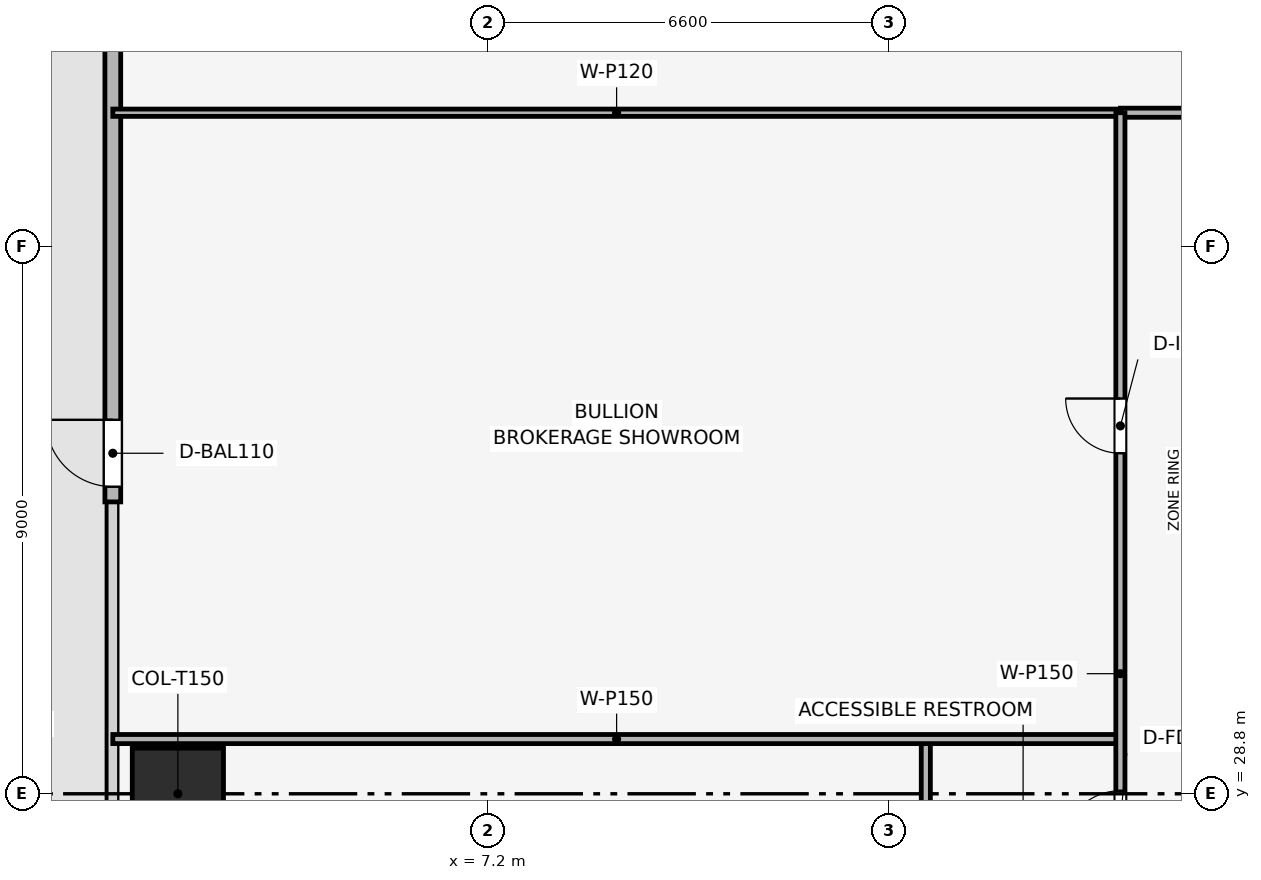
"""IFC4 building model, lengths in metres.
Left out: names, types, materials, properties, quantities, classifications, styles, units other than length and angle.
Written with IfcOpenShell. Run it as: python <this file> out.ifc"""

import sys

from ifc_helpers import new_model, si_unit, direction, frame, frame_2d, origin, origin_2d, place, context, subcontext, project, spatial, rectangle, extrude, element, fill, save


model = new_model("IFC4")
c1 = context("Model", 3, precision=1e-05, world=origin(), true_north=direction((0.0, 1.0)))
c2 = subcontext(c1, "Body", "Model", "MODEL_VIEW")
j1 = project(units=[si_unit("LENGTHUNIT", "METRE"), si_unit("PLANEANGLEUNIT", "RADIAN")], contexts=[c1])
p1 = place(None, origin())
s1 = spatial("IfcSite", under=j1, at=p1, CompositionType="ELEMENT")
p2 = place(p1, origin())
s2 = spatial("IfcBuilding", under=s1, at=p2, CompositionType="ELEMENT")
p3 = place(p2, frame((0.0, 0.0, 76.8)))
s3 = spatial("IfcBuildingStorey", under=s2, at=p3, CompositionType="ELEMENT", Elevation=76.8)
p4 = place(p3, frame((2.1, 28.8, 0.003), z_axis=(0.0, 0.0, 1.0), x_axis=(1.0, 0.0, 0.0)))
e1 = element("IfcColumn", 1, at=p4, inside=s3, PredefinedType="COLUMN", context=c2, shape_type="SweptSolid", body=[
    extrude(rectangle(XDim=1.5, YDim=1.5, at=origin_2d()), origin(), (0.0, 0.0, 1.0), 3.644),
])
p5 = place(p3, frame((1.03, 33.6, 0.0), z_axis=(0.0, 0.0, 1.0), x_axis=(0.0, 1.0, 0.0)))
e2 = element("IfcWall", 2, at=p5, inside=s3, PredefinedType="SOLIDWALL", context=c2, shape_type="SweptSolid", body=[
    extrude(rectangle(XDim=15.3, YDim=0.26, at=frame_2d((7.65, 0.0))), origin(), (0.0, 0.0, 1.0), 3.65),
])
p6 = place(p5, frame((0.25, 0.0, 0.0)))
e3 = element("IfcOpeningElement", 3, at=p6, cuts=e2, PredefinedType="OPENING", context=c2, shape_type="SweptSolid", body=[
    extrude(rectangle(XDim=1.1, YDim=2.2, at=frame_2d((0.55, 1.1))), frame((0.0, 0.14, 0.0), z_axis=(0.0, -1.0, 0.0), x_axis=(1.0, 0.0, 0.0)), (0.0, 0.0, 1.0), 0.28),
])
p7 = place(p3, frame((1.03, 40.0, 0.0), z_axis=(0.0, 0.0, 1.0), x_axis=(1.0, 0.0, 0.0)))
e4 = element("IfcWall", 4, at=p7, inside=s3, PredefinedType="PARTITIONING", context=c2, shape_type="SweptSolid", body=[
    extrude(rectangle(XDim=16.57, YDim=0.12, at=frame_2d((8.285, 0.0))), origin(), (0.0, 0.0, 1.0), 2.935),
])
p8 = place(p3, frame((14.4, 21.3, 0.0), z_axis=(0.0, 0.0, 1.0), x_axis=(0.0, 1.0, 0.0)))
e5 = element("IfcWall", 5, at=p8, inside=s3, PredefinedType="PARTITIONING", context=c2, shape_type="SweptSolid", body=[
    extrude(rectangle(XDim=8.4, YDim=0.15, at=frame_2d((4.2, 0.0))), origin(), (0.0, 0.0, 1.0), 3.085),
])
p9 = place(p3, frame((1.03, 29.7, 0.0), z_axis=(0.0, 0.0, 1.0), x_axis=(1.0, 0.0, 0.0)))
e6 = element("IfcWall", 6, at=p9, inside=s3, PredefinedType="PARTITIONING", context=c2, shape_type="SweptSolid", body=[
    extrude(rectangle(XDim=16.57, YDim=0.15, at=frame_2d((8.285, 0.0))), origin(), (0.0, 0.0, 1.0), 2.935),
])
p10 = place(p3, frame((17.6, 40.0, 0.0), z_axis=(0.0, 0.0, 1.0), x_axis=(1.0, 0.0, 0.0)))
e7 = element("IfcWall", 7, at=p10, inside=s3, PredefinedType="PARTITIONING", context=c2, shape_type="SweptSolid", body=[
    extrude(rectangle(XDim=22.4, YDim=0.15, at=frame_2d((11.2, 0.0))), origin(), (0.0, 0.0, 1.0), 3.085),
])
p11 = place(p10, frame((4.438, 0.0, 0.0)))
e8 = element("IfcOpeningElement", 8, at=p11, cuts=e7, PredefinedType="OPENING", context=c2, shape_type="SweptSolid", body=[
    extrude(rectangle(XDim=0.9, YDim=2.1, at=frame_2d((0.45, 1.05))), frame((0.0, 0.085, 0.0), z_axis=(0.0, -1.0, 0.0), x_axis=(1.0, 0.0, 0.0)), (0.0, 0.0, 1.0), 0.17),
])
p12 = place(p10, frame((15.638, 0.0, 0.0)))
e9 = element("IfcOpeningElement", 9, at=p12, cuts=e7, PredefinedType="OPENING", context=c2, shape_type="SweptSolid", body=[
    extrude(rectangle(XDim=0.9, YDim=2.1, at=frame_2d((0.45, 1.05))), frame((0.0, 0.085, 0.0), z_axis=(0.0, -1.0, 0.0), x_axis=(1.0, 0.0, 0.0)), (0.0, 0.0, 1.0), 0.17),
])
p13 = place(p3, frame((17.6, 17.6, 0.0), z_axis=(0.0, 0.0, 1.0), x_axis=(0.0, 1.0, 0.0)))
e10 = element("IfcWall", 10, at=p13, inside=s3, PredefinedType="PARTITIONING", context=c2, shape_type="SweptSolid", body=[
    extrude(rectangle(XDim=22.4, YDim=0.15, at=frame_2d((11.2, 0.0))), origin(), (0.0, 0.0, 1.0), 3.085),
])
p14 = place(p13, frame((1.4, 0.0, 0.0)))
e11 = element("IfcOpeningElement", 11, at=p14, cuts=e10, PredefinedType="OPENING", context=c2, shape_type="SweptSolid", body=[
    extrude(rectangle(XDim=0.9, YDim=2.1, at=frame_2d((0.45, 1.05))), frame((0.0, 0.085, 0.0), z_axis=(0.0, -1.0, 0.0), x_axis=(1.0, 0.0, 0.0)), (0.0, 0.0, 1.0), 0.17),
])
p15 = place(p13, frame((4.65, 0.0, 0.0)))
e12 = element("IfcOpeningElement", 12, at=p15, cuts=e10, PredefinedType="OPENING", context=c2, shape_type="SweptSolid", body=[
    extrude(rectangle(XDim=0.9, YDim=2.1, at=frame_2d((0.45, 1.05))), frame((0.0, 0.085, 0.0), z_axis=(0.0, -1.0, 0.0), x_axis=(1.0, 0.0, 0.0)), (0.0, 0.0, 1.0), 0.17),
])
p16 = place(p13, frame((7.55, 0.0, 0.0)))
e13 = element("IfcOpeningElement", 13, at=p16, cuts=e10, PredefinedType="OPENING", context=c2, shape_type="SweptSolid", body=[
    extrude(rectangle(XDim=0.9, YDim=2.1, at=frame_2d((0.45, 1.05))), frame((0.0, 0.085, 0.0), z_axis=(0.0, -1.0, 0.0), x_axis=(1.0, 0.0, 0.0)), (0.0, 0.0, 1.0), 0.17),
])
p17 = place(p13, frame((10.3, 0.0, 0.0)))
e14 = element("IfcOpeningElement", 14, at=p17, cuts=e10, PredefinedType="OPENING", context=c2, shape_type="SweptSolid", body=[
    extrude(rectangle(XDim=0.95, YDim=2.1, at=frame_2d((0.475, 1.05))), frame((0.0, 0.085, 0.0), z_axis=(0.0, -1.0, 0.0), x_axis=(1.0, 0.0, 0.0)), (0.0, 0.0, 1.0), 0.17),
])
p18 = place(p13, frame((16.8, 0.0, 0.0)))
e15 = element("IfcOpeningElement", 15, at=p18, cuts=e10, PredefinedType="OPENING", context=c2, shape_type="SweptSolid", body=[
    extrude(rectangle(XDim=0.9, YDim=2.1, at=frame_2d((0.45, 1.05))), frame((0.0, 0.085, 0.0), z_axis=(0.0, -1.0, 0.0), x_axis=(1.0, 0.0, 0.0)), (0.0, 0.0, 1.0), 0.17),
])
p19 = place(p6, origin())
e16 = element("IfcDoor", 16, at=p19, inside=s3, OperationType="SINGLE_SWING_RIGHT", PredefinedType="DOOR", context=c2, shape_type="SweptSolid", body=[
    extrude(rectangle(XDim=1.1, YDim=2.2, at=frame_2d((0.55, 1.1))), frame((0.0, 0.025, 0.0), z_axis=(0.0, -1.0, 0.0), x_axis=(1.0, 0.0, 0.0)), (0.0, 0.0, 1.0), 0.05),
])
fill(e3, e16)
p20 = place(p17, origin())
e17 = element("IfcDoor", 17, at=p20, inside=s3, OperationType="SINGLE_SWING_LEFT", PredefinedType="DOOR", context=c2, shape_type="SweptSolid", body=[
    extrude(rectangle(XDim=0.95, YDim=2.1, at=frame_2d((0.475, 1.05))), frame((0.0, 0.025, 0.0), z_axis=(0.0, -1.0, 0.0), x_axis=(1.0, 0.0, 0.0)), (0.0, 0.0, 1.0), 0.05),
])
fill(e14, e17)
p21 = place(p18, origin())
e18 = element("IfcDoor", 18, at=p21, inside=s3, OperationType="SINGLE_SWING_RIGHT", PredefinedType="DOOR", context=c2, shape_type="SweptSolid", body=[
    extrude(rectangle(XDim=0.9, YDim=2.1, at=frame_2d((0.45, 1.05))), frame((0.0, 0.025, 0.0), z_axis=(0.0, -1.0, 0.0), x_axis=(1.0, 0.0, 0.0)), (0.0, 0.0, 1.0), 0.05),
])
fill(e15, e18)
save(model, sys.argv[1])
